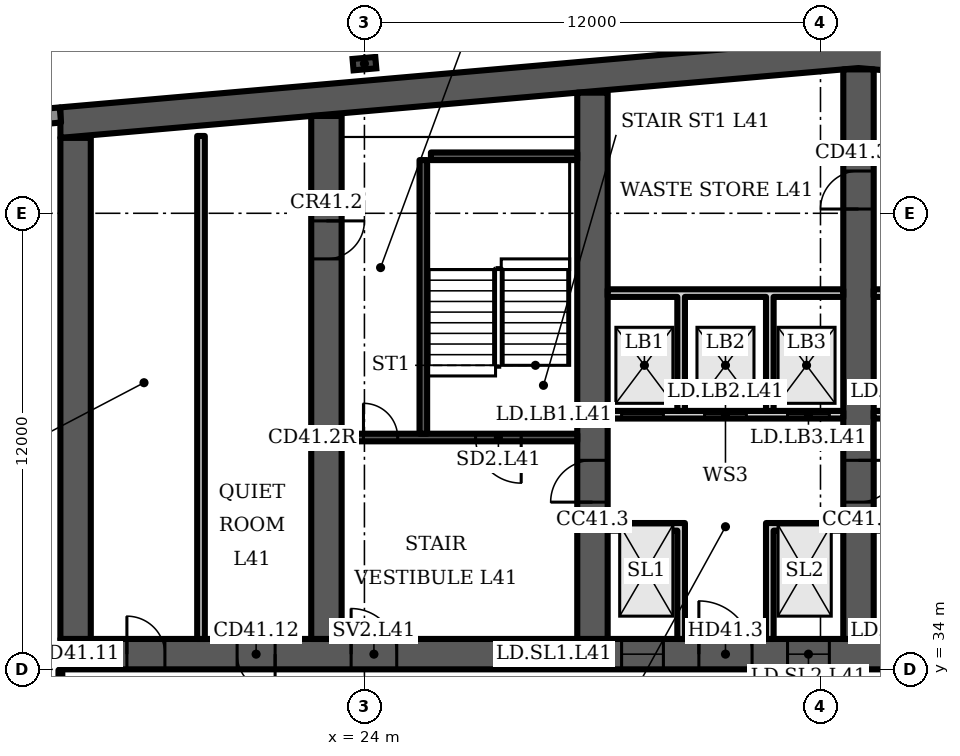
"""IFC4 building model, lengths in metres.
Left out: names, types, materials, properties, quantities, classifications, styles, units other than length and angle.
Written with IfcOpenShell. Run it as: python <this file> out.ifc"""

import sys

from ifc_helpers import new_model, si_unit, direction, frame, frame_2d, origin, origin_2d, place, context, subcontext, project, spatial, polyline, rectangle, i_section, outline, extrude, element, fill, save


model = new_model("IFC4")
c1 = context("Model", 3, precision=1e-05, world=origin(), true_north=direction((0.0, 1.0)))
c2 = subcontext(c1, "Body", "Model", "MODEL_VIEW")
j1 = project(units=[si_unit("LENGTHUNIT", "METRE"), si_unit("PLANEANGLEUNIT", "RADIAN")], contexts=[c1])
p1 = place(None, origin())
s1 = spatial("IfcSite", under=j1, at=p1, CompositionType="ELEMENT")
p2 = place(p1, origin())
s2 = spatial("IfcBuilding", under=s1, at=p2, CompositionType="ELEMENT")
p3 = place(p2, frame((0.0, 0.0, 169.9)))
s3 = spatial("IfcBuildingStorey", under=s2, at=p3, CompositionType="ELEMENT", Elevation=169.9)
p4 = place(p3, origin())
e1 = element("IfcWall", 1, at=p4, inside=s3, PredefinedType="SHEAR", context=c2, shape_type="SweptSolid", body=[
    extrude(outline(polyline([(16.0, 47.984), (37.0, 49.822), (58.0, 47.984), (58.0, 48.787), (37.0, 50.625), (16.0, 48.787), (16.0, 47.984)])), origin(), (0.0, 0.0, 1.0), 3.6),
])
p5 = place(p3, frame((16.0, 34.4, 0.0), z_axis=(0.0, 0.0, 1.0), x_axis=(1.0, 0.0, 0.0)))
e2 = element("IfcWall", 2, at=p5, inside=s3, PredefinedType="SHEAR", context=c2, shape_type="SweptSolid", body=[
    extrude(rectangle(XDim=42.0, YDim=0.8, at=frame_2d((21.0, 0.0))), origin(), (0.0, 0.0, 1.0), 3.6),
])
p6 = place(p5, frame((1.75, 0.0, 0.0)))
e3 = element("IfcOpeningElement", 3, at=p6, cuts=e2, PredefinedType="OPENING", context=c2, shape_type="SweptSolid", body=[
    extrude(rectangle(XDim=1.0, YDim=2.1, at=frame_2d((0.5, 1.05))), frame((0.0, 0.41, 0.0), z_axis=(0.0, -1.0, 0.0), x_axis=(1.0, 0.0, 0.0)), (0.0, 0.0, 1.0), 0.82),
])
p7 = place(p5, frame((4.65, 0.0, 0.0)))
e4 = element("IfcOpeningElement", 4, at=p7, cuts=e2, PredefinedType="OPENING", context=c2, shape_type="SweptSolid", body=[
    extrude(rectangle(XDim=1.0, YDim=2.1, at=frame_2d((0.5, 1.05))), frame((0.0, 0.41, 0.0), z_axis=(0.0, -1.0, 0.0), x_axis=(1.0, 0.0, 0.0)), (0.0, 0.0, 1.0), 0.82),
])
p8 = place(p5, frame((7.65, 0.0, 0.0)))
e5 = element("IfcOpeningElement", 5, at=p8, cuts=e2, PredefinedType="OPENING", context=c2, shape_type="SweptSolid", body=[
    extrude(rectangle(XDim=1.2, YDim=2.1, at=frame_2d((0.6, 1.05))), frame((0.0, 0.41, 0.0), z_axis=(0.0, -1.0, 0.0), x_axis=(1.0, 0.0, 0.0)), (0.0, 0.0, 1.0), 0.82),
])
p9 = place(p5, frame((14.767, 0.0, 0.0)))
e6 = element("IfcOpeningElement", 6, at=p9, cuts=e2, PredefinedType="OPENING", context=c2, shape_type="SweptSolid", body=[
    extrude(rectangle(XDim=1.1, YDim=2.1, at=frame_2d((0.55, 1.05))), frame((0.0, 0.41, 0.0), z_axis=(0.0, -1.0, 0.0), x_axis=(1.0, 0.0, 0.0)), (0.0, 0.0, 1.0), 0.82),
])
p10 = place(p5, frame((19.133, 0.0, 0.0)))
e7 = element("IfcOpeningElement", 7, at=p10, cuts=e2, PredefinedType="OPENING", context=c2, shape_type="SweptSolid", body=[
    extrude(rectangle(XDim=1.1, YDim=2.1, at=frame_2d((0.55, 1.05))), frame((0.0, 0.41, 0.0), z_axis=(0.0, -1.0, 0.0), x_axis=(1.0, 0.0, 0.0)), (0.0, 0.0, 1.0), 0.82),
])
p11 = place(p5, frame((16.8, 0.0, 0.0)))
e8 = element("IfcOpeningElement", 8, at=p11, cuts=e2, PredefinedType="OPENING", context=c2, shape_type="SweptSolid", body=[
    extrude(rectangle(XDim=1.4, YDim=2.1, at=frame_2d((0.7, 1.05))), frame((0.0, 0.41, 0.0), z_axis=(0.0, -1.0, 0.0), x_axis=(1.0, 0.0, 0.0)), (0.0, 0.0, 1.0), 0.82),
])
p12 = place(p5, frame((21.767, 0.0, 0.0)))
e9 = element("IfcOpeningElement", 9, at=p12, cuts=e2, PredefinedType="OPENING", context=c2, shape_type="SweptSolid", body=[
    extrude(rectangle(XDim=1.1, YDim=2.1, at=frame_2d((0.55, 1.05))), frame((0.0, 0.41, 0.0), z_axis=(0.0, -1.0, 0.0), x_axis=(1.0, 0.0, 0.0)), (0.0, 0.0, 1.0), 0.82),
])
p13 = place(p5, frame((23.95, 0.0, 0.0)))
e10 = element("IfcOpeningElement", 10, at=p13, cuts=e2, PredefinedType="OPENING", context=c2, shape_type="SweptSolid", body=[
    extrude(rectangle(XDim=1.1, YDim=2.1, at=frame_2d((0.55, 1.05))), frame((0.0, 0.41, 0.0), z_axis=(0.0, -1.0, 0.0), x_axis=(1.0, 0.0, 0.0)), (0.0, 0.0, 1.0), 0.82),
])
p14 = place(p5, frame((26.133, 0.0, 0.0)))
e11 = element("IfcOpeningElement", 11, at=p14, cuts=e2, PredefinedType="OPENING", context=c2, shape_type="SweptSolid", body=[
    extrude(rectangle(XDim=1.1, YDim=2.1, at=frame_2d((0.55, 1.05))), frame((0.0, 0.41, 0.0), z_axis=(0.0, -1.0, 0.0), x_axis=(1.0, 0.0, 0.0)), (0.0, 0.0, 1.0), 0.82),
])
p15 = place(p5, frame((33.15, 0.0, 0.0)))
e12 = element("IfcOpeningElement", 12, at=p15, cuts=e2, PredefinedType="OPENING", context=c2, shape_type="SweptSolid", body=[
    extrude(rectangle(XDim=1.2, YDim=2.1, at=frame_2d((0.6, 1.05))), frame((0.0, 0.41, 0.0), z_axis=(0.0, -1.0, 0.0), x_axis=(1.0, 0.0, 0.0)), (0.0, 0.0, 1.0), 0.82),
])
p16 = place(p5, frame((37.767, 0.0, 0.0)))
e13 = element("IfcOpeningElement", 13, at=p16, cuts=e2, PredefinedType="OPENING", context=c2, shape_type="SweptSolid", body=[
    extrude(rectangle(XDim=1.4, YDim=2.1, at=frame_2d((0.7, 1.05))), frame((0.0, 0.41, 0.0), z_axis=(0.0, -1.0, 0.0), x_axis=(1.0, 0.0, 0.0)), (0.0, 0.0, 1.0), 0.82),
])
p17 = place(p3, frame((16.4, 34.8, 0.0), z_axis=(0.0, 0.0, 1.0), x_axis=(0.0, 1.0, 0.0)))
e14 = element("IfcWall", 14, at=p17, inside=s3, PredefinedType="SHEAR", context=c2, shape_type="SweptSolid", body=[
    extrude(rectangle(XDim=13.184, YDim=0.8, at=frame_2d((6.592, 0.0))), origin(), (0.0, 0.0, 1.0), 3.6),
])
p18 = place(p3, frame((23.0, 34.8, 0.0), z_axis=(0.0, 0.0, 1.0), x_axis=(0.0, 1.0, 0.0)))
e15 = element("IfcWall", 15, at=p18, inside=s3, PredefinedType="SHEAR", context=c2, shape_type="SweptSolid", body=[
    extrude(rectangle(XDim=13.762, YDim=0.8, at=frame_2d((6.881, 0.0))), origin(), (0.0, 0.0, 1.0), 3.6),
])
p19 = place(p18, frame((10.0, 0.0, 0.0)))
e16 = element("IfcOpeningElement", 16, at=p19, cuts=e15, PredefinedType="OPENING", context=c2, shape_type="SweptSolid", body=[
    extrude(rectangle(XDim=1.0, YDim=2.1, at=frame_2d((0.5, 1.05))), frame((0.0, 0.41, 0.0), z_axis=(0.0, -1.0, 0.0), x_axis=(1.0, 0.0, 0.0)), (0.0, 0.0, 1.0), 0.82),
])
p20 = place(p3, frame((30.0, 34.8, 0.0), z_axis=(0.0, 0.0, 1.0), x_axis=(0.0, 1.0, 0.0)))
e17 = element("IfcWall", 17, at=p20, inside=s3, PredefinedType="SHEAR", context=c2, shape_type="SweptSolid", body=[
    extrude(rectangle(XDim=14.374, YDim=0.8, at=frame_2d((7.187, 0.0))), origin(), (0.0, 0.0, 1.0), 3.6),
])
p21 = place(p20, frame((3.6, 0.0, 0.0)))
e18 = element("IfcOpeningElement", 18, at=p21, cuts=e17, PredefinedType="OPENING", context=c2, shape_type="SweptSolid", body=[
    extrude(rectangle(XDim=1.1, YDim=2.1, at=frame_2d((0.55, 1.05))), frame((0.0, 0.41, 0.0), z_axis=(0.0, -1.0, 0.0), x_axis=(1.0, 0.0, 0.0)), (0.0, 0.0, 1.0), 0.82),
])
p22 = place(p3, frame((37.0, 34.8, 0.0), z_axis=(0.0, 0.0, 1.0), x_axis=(0.0, 1.0, 0.0)))
e19 = element("IfcWall", 19, at=p22, inside=s3, PredefinedType="SHEAR", context=c2, shape_type="SweptSolid", body=[
    extrude(rectangle(XDim=14.987, YDim=0.8, at=frame_2d((7.493, 0.0))), origin(), (0.0, 0.0, 1.0), 3.6),
])
p23 = place(p22, frame((11.312, 0.0, 0.0)))
e20 = element("IfcOpeningElement", 20, at=p23, cuts=e19, PredefinedType="OPENING", context=c2, shape_type="SweptSolid", body=[
    extrude(rectangle(XDim=1.0, YDim=2.1, at=frame_2d((0.5, 1.05))), frame((0.0, 0.41, 0.0), z_axis=(0.0, -1.0, 0.0), x_axis=(1.0, 0.0, 0.0)), (0.0, 0.0, 1.0), 0.82),
])
p24 = place(p22, frame((3.6, 0.0, 0.0)))
e21 = element("IfcOpeningElement", 21, at=p24, cuts=e19, PredefinedType="OPENING", context=c2, shape_type="SweptSolid", body=[
    extrude(rectangle(XDim=1.1, YDim=2.1, at=frame_2d((0.55, 1.05))), frame((0.0, 0.41, 0.0), z_axis=(0.0, -1.0, 0.0), x_axis=(1.0, 0.0, 0.0)), (0.0, 0.0, 1.0), 0.82),
])
p25 = place(p3, frame((24.0, 49.937, 0.0), z_axis=(0.0, 0.0, 1.0), x_axis=(-0.087156, 0.996198, 0.0)))
e22 = element("IfcColumn", 22, at=p25, inside=s3, PredefinedType="COLUMN", context=c2, shape_type="SweptSolid", body=[
    extrude(i_section(OverallWidth=0.3, OverallDepth=0.6, WebThickness=0.015, FlangeThickness=0.03, FilletRadius=0.027, at=origin_2d()), origin(), (0.0, 0.0, 1.0), 3.6),
])
p26 = place(p3, frame((16.0, 48.587, 0.0), z_axis=(0.0, 0.0, 1.0), x_axis=(-0.996194, -0.087168, 0.0)))
e23 = element("IfcWall", 23, at=p26, inside=s3, PredefinedType="SOLIDWALL", context=c2, shape_type="SweptSolid", body=[
    extrude(rectangle(XDim=2.994, YDim=0.4, at=frame_2d((1.497, 0.0))), origin(), (0.0, 0.0, 1.0), 3.2),
])
p27 = place(p3, frame((19.7, 34.8, 0.0), z_axis=(0.0, 0.0, 1.0), x_axis=(0.0, 1.0, 0.0)))
e24 = element("IfcWall", 24, at=p27, inside=s3, PredefinedType="PARTITIONING", context=c2, shape_type="SweptSolid", body=[
    extrude(rectangle(XDim=13.234, YDim=0.2, at=frame_2d((6.617, 0.0))), origin(), (0.0, 0.0, 1.0), 3.2),
])
p28 = place(p3, frame((23.4, 40.1, 0.0), z_axis=(0.0, 0.0, 1.0), x_axis=(1.0, 0.0, 0.0)))
e25 = element("IfcWall", 25, at=p28, inside=s3, PredefinedType="SHEAR", context=c2, shape_type="SweptSolid", body=[
    extrude(rectangle(XDim=6.2, YDim=0.2, at=frame_2d((3.1, 0.0))), origin(), (0.0, 0.0, 1.0), 3.2),
])
p29 = place(p28, frame((3.525, 0.0, 0.0)))
e26 = element("IfcOpeningElement", 26, at=p29, cuts=e25, PredefinedType="OPENING", context=c2, shape_type="SweptSolid", body=[
    extrude(rectangle(XDim=1.2, YDim=2.1, at=frame_2d((0.6, 1.05))), frame((0.0, 0.11, 0.0), z_axis=(0.0, -1.0, 0.0), x_axis=(1.0, 0.0, 0.0)), (0.0, 0.0, 1.0), 0.22),
])
p30 = place(p28, frame((0.575, 0.0, 0.0)))
e27 = element("IfcOpeningElement", 27, at=p30, cuts=e25, PredefinedType="OPENING", context=c2, shape_type="SweptSolid", body=[
    extrude(rectangle(XDim=0.9, YDim=2.1, at=frame_2d((0.45, 1.05))), frame((0.0, 0.11, 0.0), z_axis=(0.0, -1.0, 0.0), x_axis=(1.0, 0.0, 0.0)), (0.0, 0.0, 1.0), 0.22),
])
p31 = place(p3, frame((25.55, 40.2, 0.0), z_axis=(0.0, 0.0, 1.0), x_axis=(0.0, 1.0, 0.0)))
e28 = element("IfcWall", 28, at=p31, inside=s3, PredefinedType="SHEAR", context=c2, shape_type="SweptSolid", body=[
    extrude(rectangle(XDim=7.2, YDim=0.2, at=frame_2d((3.6, 0.0))), origin(), (0.0, 0.0, 1.0), 3.2),
])
p32 = place(p3, frame((25.75, 47.5, 0.0), z_axis=(0.0, 0.0, 1.0), x_axis=(1.0, 0.0, 0.0)))
e29 = element("IfcWall", 29, at=p32, inside=s3, PredefinedType="SHEAR", context=c2, shape_type="SweptSolid", body=[
    extrude(rectangle(XDim=3.85, YDim=0.2, at=frame_2d((1.925, 0.0))), origin(), (0.0, 0.0, 1.0), 3.2),
])
p33 = place(p3, frame((30.4, 40.7, 0.0), z_axis=(0.0, 0.0, 1.0), x_axis=(1.0, 0.0, 0.0)))
e30 = element("IfcWall", 30, at=p33, inside=s3, PredefinedType="PARTITIONING", context=c2, shape_type="SweptSolid", body=[
    extrude(rectangle(XDim=6.2, YDim=0.2, at=frame_2d((3.1, 0.0))), origin(), (0.0, 0.0, 1.0), 3.2),
])
p34 = place(p33, frame((0.367, 0.0, 0.0)))
e31 = element("IfcOpeningElement", 31, at=p34, cuts=e30, PredefinedType="OPENING", context=c2, shape_type="SweptSolid", body=[
    extrude(rectangle(XDim=1.1, YDim=2.1, at=frame_2d((0.55, 1.05))), frame((0.0, 0.11, 0.0), z_axis=(0.0, -1.0, 0.0), x_axis=(1.0, 0.0, 0.0)), (0.0, 0.0, 1.0), 0.22),
])
p35 = place(p33, frame((2.55, 0.0, 0.0)))
e32 = element("IfcOpeningElement", 32, at=p35, cuts=e30, PredefinedType="OPENING", context=c2, shape_type="SweptSolid", body=[
    extrude(rectangle(XDim=1.1, YDim=2.1, at=frame_2d((0.55, 1.05))), frame((0.0, 0.11, 0.0), z_axis=(0.0, -1.0, 0.0), x_axis=(1.0, 0.0, 0.0)), (0.0, 0.0, 1.0), 0.22),
])
p36 = place(p33, frame((4.733, 0.0, 0.0)))
e33 = element("IfcOpeningElement", 33, at=p36, cuts=e30, PredefinedType="OPENING", context=c2, shape_type="SweptSolid", body=[
    extrude(rectangle(XDim=1.1, YDim=2.1, at=frame_2d((0.55, 1.05))), frame((0.0, 0.11, 0.0), z_axis=(0.0, -1.0, 0.0), x_axis=(1.0, 0.0, 0.0)), (0.0, 0.0, 1.0), 0.22),
])
p37 = place(p3, origin())
e34 = element("IfcWall", 34, at=p37, inside=s3, PredefinedType="PARTITIONING", context=c2, shape_type="SweptSolid", body=[
    extrude(outline(polyline([(32.233, 37.65), (30.4, 37.65), (30.4, 37.85), (32.233, 37.85), (32.433, 37.85), (32.433, 34.8), (32.233, 34.8), (32.233, 37.65)])), origin(), (0.0, 0.0, 1.0), 3.2),
])
p38 = place(p3, origin())
e35 = element("IfcWall", 35, at=p38, inside=s3, PredefinedType="PARTITIONING", context=c2, shape_type="SweptSolid", body=[
    extrude(outline(polyline([(34.567, 37.85), (34.767, 37.85), (36.6, 37.85), (36.6, 37.65), (34.767, 37.65), (34.767, 34.8), (34.567, 34.8), (34.567, 37.85)])), origin(), (0.0, 0.0, 1.0), 3.2),
])
p39 = place(p3, origin())
e36 = element("IfcWall", 36, at=p39, inside=s3, PredefinedType="PARTITIONING", context=c2, shape_type="SweptSolid", body=[
    extrude(outline(polyline([(32.433, 40.8), (32.233, 40.8), (32.233, 43.8), (30.4, 43.8), (30.4, 44.0), (36.6, 44.0), (36.6, 43.8), (34.767, 43.8), (34.767, 40.8), (34.567, 40.8), (34.567, 43.8), (32.433, 43.8), (32.433, 40.8)])), origin(), (0.0, 0.0, 1.0), 3.2),
])
p40 = place(p3, frame((37.4, 40.7, 0.0), z_axis=(0.0, 0.0, 1.0), x_axis=(1.0, 0.0, 0.0)))
e37 = element("IfcWall", 37, at=p40, inside=s3, PredefinedType="PARTITIONING", context=c2, shape_type="SweptSolid", body=[
    extrude(rectangle(XDim=6.2, YDim=0.2, at=frame_2d((3.1, 0.0))), origin(), (0.0, 0.0, 1.0), 3.2),
])
p41 = place(p40, frame((0.367, 0.0, 0.0)))
e38 = element("IfcOpeningElement", 38, at=p41, cuts=e37, PredefinedType="OPENING", context=c2, shape_type="SweptSolid", body=[
    extrude(rectangle(XDim=1.1, YDim=2.1, at=frame_2d((0.55, 1.05))), frame((0.0, 0.11, 0.0), z_axis=(0.0, -1.0, 0.0), x_axis=(1.0, 0.0, 0.0)), (0.0, 0.0, 1.0), 0.22),
])
p42 = place(p40, frame((2.55, 0.0, 0.0)))
e39 = element("IfcOpeningElement", 39, at=p42, cuts=e37, PredefinedType="OPENING", context=c2, shape_type="SweptSolid", body=[
    extrude(rectangle(XDim=1.1, YDim=2.1, at=frame_2d((0.55, 1.05))), frame((0.0, 0.11, 0.0), z_axis=(0.0, -1.0, 0.0), x_axis=(1.0, 0.0, 0.0)), (0.0, 0.0, 1.0), 0.22),
])
p43 = place(p40, frame((4.733, 0.0, 0.0)))
e40 = element("IfcOpeningElement", 40, at=p43, cuts=e37, PredefinedType="OPENING", context=c2, shape_type="SweptSolid", body=[
    extrude(rectangle(XDim=1.1, YDim=2.1, at=frame_2d((0.55, 1.05))), frame((0.0, 0.11, 0.0), z_axis=(0.0, -1.0, 0.0), x_axis=(1.0, 0.0, 0.0)), (0.0, 0.0, 1.0), 0.22),
])
p44 = place(p3, origin())
e41 = element("IfcWall", 41, at=p44, inside=s3, PredefinedType="PARTITIONING", context=c2, shape_type="SweptSolid", body=[
    extrude(outline(polyline([(41.567, 37.1), (39.433, 37.1), (39.433, 34.8), (39.233, 34.8), (39.233, 37.65), (37.4, 37.65), (37.4, 37.85), (39.233, 37.85), (39.433, 37.85), (39.433, 37.3), (41.567, 37.3), (41.567, 37.55), (41.767, 37.55), (43.6, 37.55), (43.6, 37.35), (41.767, 37.35), (41.767, 34.8), (41.567, 34.8), (41.567, 37.1)])), origin(), (0.0, 0.0, 1.0), 3.2),
])
p45 = place(p3, origin())
e42 = element("IfcWall", 42, at=p45, inside=s3, PredefinedType="PARTITIONING", context=c2, shape_type="SweptSolid", body=[
    extrude(outline(polyline([(39.433, 40.8), (39.233, 40.8), (39.233, 43.8), (37.4, 43.8), (37.4, 44.0), (43.6, 44.0), (43.6, 43.8), (41.767, 43.8), (41.767, 40.8), (41.567, 40.8), (41.567, 43.8), (39.433, 43.8), (39.433, 40.8)])), origin(), (0.0, 0.0, 1.0), 3.2),
])
p46 = place(p3, frame((37.0, 30.5, 0.0), z_axis=(0.0, 0.0, 1.0), x_axis=(0.0, 1.0, 0.0)))
e43 = element("IfcWall", 43, at=p46, inside=s3, PredefinedType="PARTITIONING", context=c2, shape_type="SweptSolid", body=[
    extrude(rectangle(XDim=3.5, YDim=0.2, at=frame_2d((1.75, 0.0))), origin(), (0.0, 0.0, 1.0), 3.2),
])
p47 = place(p46, frame((1.2, 0.0, 0.0)))
e44 = element("IfcOpeningElement", 44, at=p47, cuts=e43, PredefinedType="OPENING", context=c2, shape_type="SweptSolid", body=[
    extrude(rectangle(XDim=1.1, YDim=2.1, at=frame_2d((0.55, 1.05))), frame((0.0, 0.11, 0.0), z_axis=(0.0, -1.0, 0.0), x_axis=(1.0, 0.0, 0.0)), (0.0, 0.0, 1.0), 0.22),
])
p48 = place(p3, frame((16.0, 26.42, 0.0), z_axis=(0.0, 0.0, 1.0), x_axis=(0.0, 1.0, 0.0)))
e45 = element("IfcWall", 45, at=p48, inside=s3, PredefinedType="PARTITIONING", context=c2, shape_type="SweptSolid", body=[
    extrude(rectangle(XDim=7.56, YDim=0.1, at=frame_2d((3.78, 0.0))), origin(), (0.0, 0.0, 1.0), 3.2),
])
p49 = place(p48, frame((1.48, 0.0, 0.0)))
e46 = element("IfcOpeningElement", 46, at=p49, cuts=e45, PredefinedType="OPENING", context=c2, shape_type="SweptSolid", body=[
    extrude(rectangle(XDim=1.8, YDim=2.1, at=frame_2d((0.9, 1.05))), frame((0.0, 0.06, 0.0), z_axis=(0.0, -1.0, 0.0), x_axis=(1.0, 0.0, 0.0)), (0.0, 0.0, 1.0), 0.12),
])
p50 = place(p6, origin())
e47 = element("IfcDoor", 47, at=p50, inside=s3, OperationType="SINGLE_SWING_LEFT", PredefinedType="DOOR", context=c2, shape_type="SweptSolid", body=[
    extrude(rectangle(XDim=1.0, YDim=2.1, at=frame_2d((0.5, 1.05))), frame((0.0, 0.4, 0.0), z_axis=(0.0, -1.0, 0.0), x_axis=(1.0, 0.0, 0.0)), (0.0, 0.0, 1.0), 0.8),
])
fill(e3, e47)
p51 = place(p7, origin())
e48 = element("IfcDoor", 48, at=p51, inside=s3, OperationType="SINGLE_SWING_RIGHT", PredefinedType="DOOR", context=c2, shape_type="SweptSolid", body=[
    extrude(rectangle(XDim=1.0, YDim=2.1, at=frame_2d((0.5, 1.05))), frame((0.0, 0.4, 0.0), z_axis=(0.0, -1.0, 0.0), x_axis=(1.0, 0.0, 0.0)), (0.0, 0.0, 1.0), 0.8),
])
fill(e4, e48)
p52 = place(p29, origin())
e49 = element("IfcDoor", 49, at=p52, inside=s3, OperationType="SINGLE_SWING_RIGHT", PredefinedType="DOOR", context=c2, shape_type="SweptSolid", body=[
    extrude(rectangle(XDim=1.2, YDim=2.1, at=frame_2d((0.6, 1.05))), frame((0.0, 0.025, 0.0), z_axis=(0.0, -1.0, 0.0), x_axis=(1.0, 0.0, 0.0)), (0.0, 0.0, 1.0), 0.05),
])
fill(e26, e49)
p53 = place(p30, origin())
e50 = element("IfcDoor", 50, at=p53, inside=s3, OperationType="SINGLE_SWING_LEFT", PredefinedType="DOOR", context=c2, shape_type="SweptSolid", body=[
    extrude(rectangle(XDim=0.9, YDim=2.1, at=frame_2d((0.45, 1.05))), frame((0.0, 0.025, 0.0), z_axis=(0.0, -1.0, 0.0), x_axis=(1.0, 0.0, 0.0)), (0.0, 0.0, 1.0), 0.05),
])
fill(e27, e50)
p54 = place(p8, origin())
e51 = element("IfcDoor", 51, at=p54, inside=s3, OperationType="SINGLE_SWING_LEFT", PredefinedType="DOOR", context=c2, shape_type="SweptSolid", body=[
    extrude(rectangle(XDim=1.2, YDim=2.1, at=frame_2d((0.6, 1.05))), frame((0.0, 0.025, 0.0), z_axis=(0.0, -1.0, 0.0), x_axis=(1.0, 0.0, 0.0)), (0.0, 0.0, 1.0), 0.05),
])
fill(e5, e51)
p55 = place(p9, origin())
e52 = element("IfcDoor", 52, at=p55, inside=s3, OperationType="DOUBLE_DOOR_SLIDING", PredefinedType="DOOR", context=c2, shape_type="SweptSolid", body=[
    extrude(rectangle(XDim=1.1, YDim=2.1, at=frame_2d((0.55, 1.05))), frame((0.0, 0.025, 0.0), z_axis=(0.0, -1.0, 0.0), x_axis=(1.0, 0.0, 0.0)), (0.0, 0.0, 1.0), 0.05),
])
fill(e6, e52)
p56 = place(p10, origin())
e53 = element("IfcDoor", 53, at=p56, inside=s3, OperationType="DOUBLE_DOOR_SLIDING", PredefinedType="DOOR", context=c2, shape_type="SweptSolid", body=[
    extrude(rectangle(XDim=1.1, YDim=2.1, at=frame_2d((0.55, 1.05))), frame((0.0, 0.025, 0.0), z_axis=(0.0, -1.0, 0.0), x_axis=(1.0, 0.0, 0.0)), (0.0, 0.0, 1.0), 0.05),
])
fill(e7, e53)
p57 = place(p11, origin())
e54 = element("IfcDoor", 54, at=p57, inside=s3, OperationType="DOUBLE_DOOR_SINGLE_SWING", PredefinedType="DOOR", context=c2, shape_type="SweptSolid", body=[
    extrude(rectangle(XDim=1.4, YDim=2.1, at=frame_2d((0.7, 1.05))), frame((0.0, 0.025, 0.0), z_axis=(0.0, -1.0, 0.0), x_axis=(1.0, 0.0, 0.0)), (0.0, 0.0, 1.0), 0.05),
])
fill(e8, e54)
p58 = place(p34, origin())
e55 = element("IfcDoor", 55, at=p58, inside=s3, OperationType="DOUBLE_DOOR_SLIDING", PredefinedType="DOOR", context=c2, shape_type="SweptSolid", body=[
    extrude(rectangle(XDim=1.1, YDim=2.1, at=frame_2d((0.55, 1.05))), frame((0.0, 0.025, 0.0), z_axis=(0.0, -1.0, 0.0), x_axis=(1.0, 0.0, 0.0)), (0.0, 0.0, 1.0), 0.05),
])
fill(e31, e55)
p59 = place(p35, origin())
e56 = element("IfcDoor", 56, at=p59, inside=s3, OperationType="DOUBLE_DOOR_SLIDING", PredefinedType="DOOR", context=c2, shape_type="SweptSolid", body=[
    extrude(rectangle(XDim=1.1, YDim=2.1, at=frame_2d((0.55, 1.05))), frame((0.0, 0.025, 0.0), z_axis=(0.0, -1.0, 0.0), x_axis=(1.0, 0.0, 0.0)), (0.0, 0.0, 1.0), 0.05),
])
fill(e32, e56)
p60 = place(p36, origin())
e57 = element("IfcDoor", 57, at=p60, inside=s3, OperationType="DOUBLE_DOOR_SLIDING", PredefinedType="DOOR", context=c2, shape_type="SweptSolid", body=[
    extrude(rectangle(XDim=1.1, YDim=2.1, at=frame_2d((0.55, 1.05))), frame((0.0, 0.025, 0.0), z_axis=(0.0, -1.0, 0.0), x_axis=(1.0, 0.0, 0.0)), (0.0, 0.0, 1.0), 0.05),
])
fill(e33, e57)
p61 = place(p23, origin())
e58 = element("IfcDoor", 58, at=p61, inside=s3, OperationType="SINGLE_SWING_LEFT", PredefinedType="DOOR", context=c2, shape_type="SweptSolid", body=[
    extrude(rectangle(XDim=1.0, YDim=2.1, at=frame_2d((0.5, 1.05))), frame((0.0, 0.4, 0.0), z_axis=(0.0, -1.0, 0.0), x_axis=(1.0, 0.0, 0.0)), (0.0, 0.0, 1.0), 0.8),
])
fill(e20, e58)
p62 = place(p19, origin())
e59 = element("IfcDoor", 59, at=p62, inside=s3, OperationType="SINGLE_SWING_RIGHT", PredefinedType="DOOR", context=c2, shape_type="SweptSolid", body=[
    extrude(rectangle(XDim=1.0, YDim=2.1, at=frame_2d((0.5, 1.05))), frame((0.0, 0.4, 0.0), z_axis=(0.0, -1.0, 0.0), x_axis=(1.0, 0.0, 0.0)), (0.0, 0.0, 1.0), 0.8),
])
fill(e16, e59)
p63 = place(p21, origin())
e60 = element("IfcDoor", 60, at=p63, inside=s3, OperationType="SINGLE_SWING_LEFT", PredefinedType="DOOR", context=c2, shape_type="SweptSolid", body=[
    extrude(rectangle(XDim=1.1, YDim=2.1, at=frame_2d((0.55, 1.05))), frame((0.0, 0.025, 0.0), z_axis=(0.0, -1.0, 0.0), x_axis=(1.0, 0.0, 0.0)), (0.0, 0.0, 1.0), 0.05),
])
fill(e18, e60)
p64 = place(p24, origin())
e61 = element("IfcDoor", 61, at=p64, inside=s3, OperationType="SINGLE_SWING_RIGHT", PredefinedType="DOOR", context=c2, shape_type="SweptSolid", body=[
    extrude(rectangle(XDim=1.1, YDim=2.1, at=frame_2d((0.55, 1.05))), frame((0.0, 0.025, 0.0), z_axis=(0.0, -1.0, 0.0), x_axis=(1.0, 0.0, 0.0)), (0.0, 0.0, 1.0), 0.05),
])
fill(e21, e61)
save(model, sys.argv[1])
